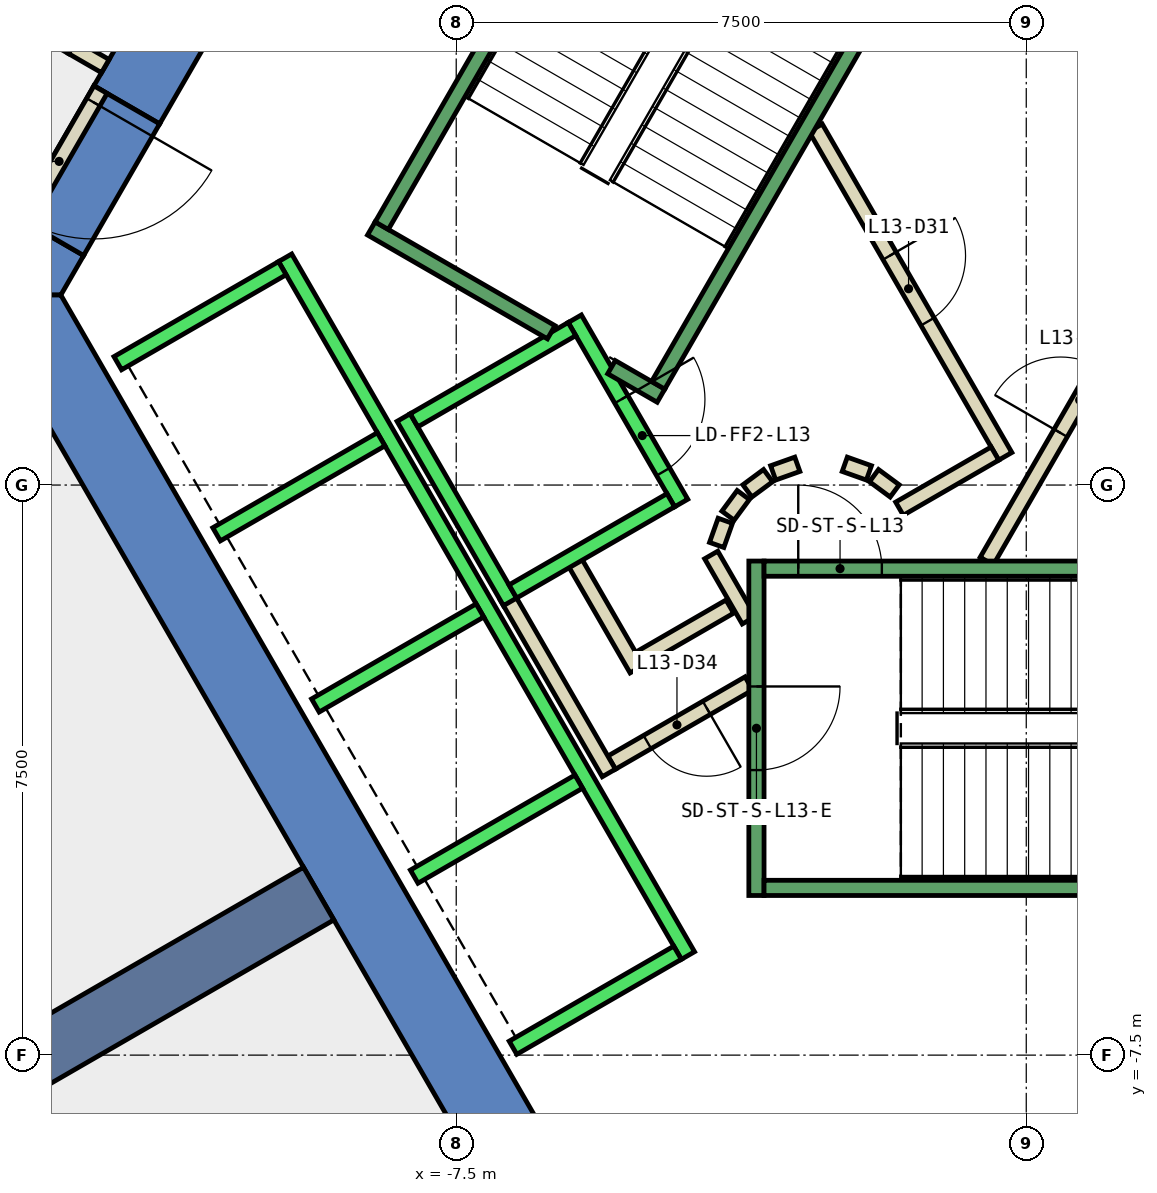
"""IFC4 building model, lengths in metres.
Left out: names, types, materials, properties, quantities, classifications, styles, units other than length and angle.
Written with IfcOpenShell. Run it as: python <this file> out.ifc"""

import sys

from ifc_helpers import new_model, si_unit, direction, frame, frame_2d, origin, place, context, subcontext, project, spatial, polyline, rectangle, outline, extrude, element, fill, save


model = new_model("IFC4")
c1 = context("Model", 3, precision=1e-05, world=origin(), true_north=direction((0.0, 1.0)))
c2 = subcontext(c1, "Body", "Model", "MODEL_VIEW")
j1 = project(units=[si_unit("LENGTHUNIT", "METRE"), si_unit("PLANEANGLEUNIT", "RADIAN")], contexts=[c1])
p1 = place(None, origin())
s1 = spatial("IfcSite", under=j1, at=p1, CompositionType="ELEMENT")
p2 = place(p1, origin())
s2 = spatial("IfcBuilding", under=s1, at=p2, CompositionType="ELEMENT")
p3 = place(p2, frame((0.0, 0.0, 64.4)))
s3 = spatial("IfcBuildingStorey", under=s2, at=p3, CompositionType="ELEMENT", Elevation=64.4)
p4 = place(p3, frame((0.0, 0.0, -0.4)))
e1 = element("IfcWall", 1, at=p4, inside=s3, PredefinedType="SHEAR", context=c2, shape_type="SweptSolid", body=[
    extrude(outline(polyline([(-12.267, 5.252), (-11.402, 4.752), (-6.351, 13.5), (-6.928, 14.5), (-12.267, 5.252)])), origin(), (0.0, 0.0, 1.0), 4.2),
])
p5 = place(p3, frame((0.0, 0.0, -0.4)))
e2 = element("IfcWall", 2, at=p5, inside=s3, PredefinedType="SHEAR", context=c2, shape_type="SweptSolid", body=[
    extrude(outline(polyline([(-12.402, 3.02), (-13.267, 3.52), (-13.856, 2.5), (-12.702, 2.5), (-12.402, 3.02)])), origin(), (0.0, 0.0, 1.0), 4.2),
])
p6 = place(p3, frame((0.0, 0.0, 3.6)))
e3 = element("IfcWall", 3, at=p6, inside=s3, PredefinedType="SHEAR", context=c2, shape_type="SweptSolid", body=[
    extrude(outline(polyline([(-13.267, 3.52), (-12.402, 3.02), (-11.402, 4.752), (-12.267, 5.252), (-13.267, 3.52)])), origin(), (0.0, 0.0, 1.0), 0.2),
])
p7 = place(p3, frame((0.0, 0.0, -0.4)))
e4 = element("IfcWall", 4, at=p7, inside=s3, PredefinedType="SHEAR", context=c2, shape_type="SweptSolid", body=[
    extrude(outline(polyline([(-13.856, 2.5), (-6.928, -9.5), (-6.351, -8.5), (-12.702, 2.5), (-13.856, 2.5)])), origin(), (0.0, 0.0, 1.0), 4.2),
])
p8 = place(p3, frame((-9.31, -5.375, -0.4), z_axis=(0.0, 0.0, 1.0), x_axis=(-0.866017533419, -0.500013631625, 0.0)))
e5 = element("IfcWall", 5, at=p8, inside=s3, PredefinedType="SHEAR", context=c2, shape_type="SweptSolid", body=[
    extrude(rectangle(XDim=9.0, YDim=0.8, at=frame_2d((4.5, 0.0))), origin(), (0.0, 0.0, 1.0), 4.2),
])
p9 = place(p3, frame((-17.783, 8.783, 0.0), z_axis=(0.0, 0.0, 1.0), x_axis=(0.866041598752, -0.499971948444, 0.0)))
e6 = element("IfcWall", 6, at=p9, inside=s3, PredefinedType="PARTITIONING", context=c2, shape_type="SweptSolid", body=[
    extrude(rectangle(XDim=6.042, YDim=0.2, at=frame_2d((3.021, 0.0))), origin(), (0.0, 0.0, 1.0), 3.8),
])
p10 = place(p9, frame((2.771, 0.0, 0.0)))
e7 = element("IfcOpeningElement", 7, at=p10, cuts=e6, PredefinedType="OPENING", context=c2, shape_type="SweptSolid", body=[
    extrude(rectangle(XDim=1.0, YDim=2.1, at=frame_2d((0.5, 1.05))), frame((0.0, 0.11, 0.0), z_axis=(0.0, -1.0, 0.0), x_axis=(1.0, 0.0, 0.0)), (0.0, 0.0, 1.0), 0.22),
])
p11 = place(p3, frame((-3.9, -1.599, 0.0), z_axis=(0.0, 0.0, 1.0), x_axis=(-0.865969445389, -0.500096910261, 0.0)))
e8 = element("IfcWall", 8, at=p11, inside=s3, PredefinedType="PARTITIONING", context=c2, shape_type="SweptSolid", body=[
    extrude(rectangle(XDim=1.373, YDim=0.2, at=frame_2d((0.687, 0.0))), origin(), (0.0, 0.0, 1.0), 3.8),
])
p12 = place(p3, frame((-5.126, -2.422, 0.0), z_axis=(0.0, 0.0, 1.0), x_axis=(-0.500062241894, 0.865989465428, 0.0)))
e9 = element("IfcWall", 9, at=p12, inside=s3, PredefinedType="PARTITIONING", context=c2, shape_type="SweptSolid", body=[
    extrude(rectangle(XDim=1.7, YDim=0.2, at=frame_2d((0.85, 0.0))), origin(), (0.0, 0.0, 1.0), 3.8),
])
p13 = place(p3, frame((-3.65, -2.61, 0.0), z_axis=(0.0, 0.0, 1.0), x_axis=(-0.866072462134, -0.499918483688, 0.0)))
e10 = element("IfcWall", 10, at=p13, inside=s3, PredefinedType="PARTITIONING", context=c2, shape_type="SweptSolid", body=[
    extrude(rectangle(XDim=2.084, YDim=0.2, at=frame_2d((1.042, 0.0))), origin(), (0.0, 0.0, 1.0), 3.8),
])
p14 = place(p13, frame((0.642, 0.0, 0.0)))
e11 = element("IfcOpeningElement", 11, at=p14, cuts=e10, PredefinedType="OPENING", context=c2, shape_type="SweptSolid", body=[
    extrude(rectangle(XDim=0.9, YDim=2.1, at=frame_2d((0.45, 1.05))), frame((0.0, 0.11, 0.0), z_axis=(0.0, -1.0, 0.0), x_axis=(1.0, 0.0, 0.0)), (0.0, 0.0, 1.0), 0.22),
])
p15 = place(p3, frame((-5.492, -3.788, 0.0), z_axis=(0.0, 0.0, 1.0), x_axis=(-0.500008949224, 0.866020236886, 0.0)))
e12 = element("IfcWall", 12, at=p15, inside=s3, PredefinedType="PARTITIONING", context=c2, shape_type="SweptSolid", body=[
    extrude(rectangle(XDim=2.68, YDim=0.2, at=frame_2d((1.34, 0.0))), origin(), (0.0, 0.0, 1.0), 3.8),
])
p16 = place(p3, frame((-4.145, -0.92, 0.0), z_axis=(0.0, 0.0, 1.0), x_axis=(0.499743786207, -0.866173278362, 0.0)))
e13 = element("IfcWall", 13, at=p16, inside=s3, PredefinedType="PARTITIONING", context=c2, shape_type="SweptSolid", body=[
    extrude(rectangle(XDim=0.991, YDim=0.2, at=frame_2d((0.495, 0.0))), origin(), (0.0, 0.0, 1.0), 3.8),
])
p17 = place(p3, frame((-0.52, -1.0, 0.0), z_axis=(0.0, 0.0, 1.0), x_axis=(0.50011622646, 0.865958290007, 0.0)))
e14 = element("IfcWall", 14, at=p17, inside=s3, PredefinedType="PARTITIONING", context=c2, shape_type="SweptSolid", body=[
    extrude(rectangle(XDim=4.991, YDim=0.2, at=frame_2d((2.496, 0.0))), origin(), (0.0, 0.0, 1.0), 3.8),
])
p18 = place(p17, frame((1.945, 0.0, 0.0)))
e15 = element("IfcOpeningElement", 15, at=p18, cuts=e14, PredefinedType="OPENING", context=c2, shape_type="SweptSolid", body=[
    extrude(rectangle(XDim=1.0, YDim=2.1, at=frame_2d((0.5, 1.05))), frame((0.0, 0.11, 0.0), z_axis=(0.0, -1.0, 0.0), x_axis=(1.0, 0.0, 0.0)), (0.0, 0.0, 1.0), 0.22),
])
p19 = place(p3, frame((-2.771, 4.7, 0.0), z_axis=(0.0, 0.0, 1.0), x_axis=(0.499969479948, -0.866043023828, 0.0)))
e16 = element("IfcWall", 16, at=p19, inside=s3, PredefinedType="PARTITIONING", context=c2, shape_type="SweptSolid", body=[
    extrude(rectangle(XDim=4.99, YDim=0.2, at=frame_2d((2.495, 0.0))), origin(), (0.0, 0.0, 1.0), 3.8),
])
p20 = place(p19, frame((1.945, 0.0, 0.0)))
e17 = element("IfcOpeningElement", 17, at=p20, cuts=e16, PredefinedType="OPENING", context=c2, shape_type="SweptSolid", body=[
    extrude(rectangle(XDim=1.0, YDim=2.1, at=frame_2d((0.5, 1.05))), frame((0.0, 0.11, 0.0), z_axis=(0.0, -1.0, 0.0), x_axis=(1.0, 0.0, 0.0)), (0.0, 0.0, 1.0), 0.22),
])
p21 = place(p3, frame((-0.412, 0.414, 0.0), z_axis=(0.0, 0.0, 1.0), x_axis=(-0.866017369001, -0.500013916395, 0.0)))
e18 = element("IfcWall", 18, at=p21, inside=s3, PredefinedType="PARTITIONING", context=c2, shape_type="SweptSolid", body=[
    extrude(rectangle(XDim=1.45, YDim=0.2, at=frame_2d((0.725, 0.0))), origin(), (0.0, 0.0, 1.0), 3.8),
])
p22 = place(p3, frame((-1.731, -0.077, 0.0), z_axis=(0.0, 0.0, 1.0), x_axis=(-0.804311165252, 0.594208338422, 0.0)))
e19 = element("IfcWall", 19, at=p22, inside=s3, PredefinedType="PARTITIONING", context=c2, shape_type="SweptSolid", body=[
    extrude(rectangle(XDim=0.338, YDim=0.2, at=frame_2d((0.169, 0.0))), origin(), (0.0, 0.0, 1.0), 3.8),
])
p23 = place(p3, frame((-2.07, 0.16, 0.0), z_axis=(0.0, 0.0, 1.0), x_axis=(-0.942199461132, 0.335052496547, 0.0)))
e20 = element("IfcWall", 20, at=p23, inside=s3, PredefinedType="PARTITIONING", context=c2, shape_type="SweptSolid", body=[
    extrude(rectangle(XDim=0.337, YDim=0.2, at=frame_2d((0.169, 0.0))), origin(), (0.0, 0.0, 1.0), 3.8),
])
p24 = place(p3, frame((-3.012, 0.273, 0.0), z_axis=(0.0, 0.0, 1.0), x_axis=(-0.942280615813, -0.334824194261, 0.0)))
e21 = element("IfcWall", 21, at=p24, inside=s3, PredefinedType="PARTITIONING", context=c2, shape_type="SweptSolid", body=[
    extrude(rectangle(XDim=0.338, YDim=0.2, at=frame_2d((0.169, 0.0))), origin(), (0.0, 0.0, 1.0), 3.8),
])
p25 = place(p3, frame((-3.397, 0.124, 0.0), z_axis=(0.0, 0.0, 1.0), x_axis=(-0.804311165252, -0.594208338422, 0.0)))
e22 = element("IfcWall", 22, at=p25, inside=s3, PredefinedType="PARTITIONING", context=c2, shape_type="SweptSolid", body=[
    extrude(rectangle(XDim=0.338, YDim=0.2, at=frame_2d((0.169, 0.0))), origin(), (0.0, 0.0, 1.0), 3.8),
])
p26 = place(p3, frame((-3.723, -0.131, 0.0), z_axis=(0.0, 0.0, 1.0), x_axis=(-0.594675113454, -0.803966112121, 0.0)))
e23 = element("IfcWall", 23, at=p26, inside=s3, PredefinedType="PARTITIONING", context=c2, shape_type="SweptSolid", body=[
    extrude(rectangle(XDim=0.338, YDim=0.2, at=frame_2d((0.169, 0.0))), origin(), (0.0, 0.0, 1.0), 3.8),
])
p27 = place(p3, frame((-3.96, -0.47, 0.0), z_axis=(0.0, 0.0, 1.0), x_axis=(-0.334824194261, -0.942280615813, 0.0)))
e24 = element("IfcWall", 24, at=p27, inside=s3, PredefinedType="PARTITIONING", context=c2, shape_type="SweptSolid", body=[
    extrude(rectangle(XDim=0.338, YDim=0.2, at=frame_2d((0.169, 0.0))), origin(), (0.0, 0.0, 1.0), 3.8),
])
p28 = place(p3, frame((-12.18, 5.202, 0.0), z_axis=(0.0, 0.0, 1.0), x_axis=(-0.50002537861, -0.866010750942, 0.0)))
e25 = element("IfcWall", 25, at=p28, inside=s3, PredefinedType="PARTITIONING", context=c2, shape_type="SweptSolid", body=[
    extrude(rectangle(XDim=2.0, YDim=0.2, at=frame_2d((1.0, 0.0))), origin(), (0.0, 0.0, 1.0), 2.4),
])
p29 = place(p28, frame((0.19, 0.0, 0.0)))
e26 = element("IfcOpeningElement", 26, at=p29, cuts=e25, PredefinedType="OPENING", context=c2, shape_type="SweptSolid", body=[
    extrude(rectangle(XDim=1.8, YDim=2.1, at=frame_2d((0.9, 1.05))), frame((0.0, 0.11, 0.0), z_axis=(0.0, -1.0, 0.0), x_axis=(1.0, 0.0, 0.0)), (0.0, 0.0, 1.0), 0.22),
])
p30 = place(p3, frame((-12.55, 5.762, 0.0), z_axis=(0.0, 0.0, 1.0), x_axis=(0.866071776036, -0.499919672301, 0.0)))
e27 = element("IfcWall", 27, at=p30, inside=s3, PredefinedType="PARTITIONING", context=c2, shape_type="SweptSolid", body=[
    extrude(rectangle(XDim=0.5, YDim=0.2, at=frame_2d((0.25, 0.0))), origin(), (0.0, 0.0, 1.0), 2.4),
])
p31 = place(p3, frame((-5.94, 2.188, 0.0), z_axis=(0.0, 0.0, 1.0), x_axis=(0.49994636267, -0.866056369097, 0.0)))
e28 = element("IfcWall", 28, at=p31, inside=s3, PredefinedType="STANDARD", context=c2, shape_type="SweptSolid", body=[
    extrude(rectangle(XDim=2.8, YDim=0.2, at=frame_2d((1.4, 0.0))), origin(), (0.0, 0.0, 1.0), 3.8),
])
p32 = place(p31, frame((1.225, 0.0, 0.0)))
e29 = element("IfcOpeningElement", 29, at=p32, cuts=e28, PredefinedType="OPENING", context=c2, shape_type="SweptSolid", body=[
    extrude(rectangle(XDim=1.1, YDim=2.1, at=frame_2d((0.55, 1.05))), frame((0.0, 0.11, 0.0), z_axis=(0.0, -1.0, 0.0), x_axis=(1.0, 0.0, 0.0)), (0.0, 0.0, 1.0), 0.22),
])
p33 = place(p3, frame((-8.192, 0.888, 0.0), z_axis=(0.0, 0.0, 1.0), x_axis=(0.49994636267, -0.866056369097, 0.0)))
e30 = element("IfcWall", 30, at=p33, inside=s3, PredefinedType="STANDARD", context=c2, shape_type="SweptSolid", body=[
    extrude(rectangle(XDim=2.8, YDim=0.2, at=frame_2d((1.4, 0.0))), origin(), (0.0, 0.0, 1.0), 3.8),
])
for number, where, z_axis, x_axis in (
    (31, (-5.977, 2.052, 0.0), (0.0, 0.0, 1.0), (-0.866, -0.5, 0.0)),
    (32, (-4.677, -0.2, 0.0), (0.0, 0.0, 1.0), (-0.866, -0.5, 0.0)),
):
    element("IfcWall", number, at=place(p3, frame(where, z_axis=z_axis, x_axis=x_axis)), inside=s3, PredefinedType="STANDARD", context=c2, shape_type="SweptSolid", body=[
        extrude(rectangle(XDim=2.399, YDim=0.2, at=frame_2d((1.2, 0.0))), origin(), (0.0, 0.0, 1.0), 3.8),
    ])
p34 = place(p3, frame((-9.751, 2.99, 0.0), z_axis=(0.0, 0.0, 1.0), x_axis=(0.50000090737, -0.866024879913, 0.0)))
e33 = element("IfcWall", 33, at=p34, inside=s3, PredefinedType="STANDARD", context=c2, shape_type="SweptSolid", body=[
    extrude(rectangle(XDim=10.6, YDim=0.2, at=frame_2d((5.3, 0.0))), origin(), (0.0, 0.0, 1.0), 3.8),
])
p35 = place(p3, frame((-9.788, 2.853, 0.0), z_axis=(0.0, 0.0, 1.0), x_axis=(-0.865998541277, -0.500046524342, 0.0)))
e34 = element("IfcWall", 34, at=p35, inside=s3, PredefinedType="STANDARD", context=c2, shape_type="SweptSolid", body=[
    extrude(rectangle(XDim=2.5, YDim=0.2, at=frame_2d((1.25, 0.0))), origin(), (0.0, 0.0, 1.0), 3.8),
])
for number, where, z_axis, x_axis in (
    (35, (-8.488, 0.602, 0.0), (0.0, 0.0, 1.0), (-0.866, -0.5, 0.0)),
    (36, (-7.188, -1.65, 0.0), (0.0, 0.0, 1.0), (-0.866, -0.5, 0.0)),
    (37, (-5.888, -3.902, 0.0), (0.0, 0.0, 1.0), (-0.866, -0.5, 0.0)),
    (38, (-4.588, -6.153, 0.0), (0.0, 0.0, 1.0), (-0.866, -0.5, 0.0)),
):
    element("IfcWall", number, at=place(p3, frame(where, z_axis=z_axis, x_axis=x_axis)), inside=s3, PredefinedType="STANDARD", context=c2, shape_type="SweptSolid", body=[
        extrude(rectangle(XDim=2.5, YDim=0.2, at=frame_2d((1.25, 0.0))), origin(), (0.0, 0.0, 1.0), 3.8),
    ])
p36 = place(p3, frame((-3.55, -1.0, 0.0), z_axis=(0.0, 0.0, 1.0), x_axis=(0.0, -1.0, 0.0)))
e39 = element("IfcWall", 39, at=p36, inside=s3, PredefinedType="STANDARD", context=c2, shape_type="SweptSolid", body=[
    extrude(rectangle(XDim=4.4, YDim=0.2, at=frame_2d((2.2, 0.0))), origin(), (0.0, 0.0, 1.0), 3.8),
])
p37 = place(p36, frame((1.65, 0.0, 0.0)))
e40 = element("IfcOpeningElement", 40, at=p37, cuts=e39, PredefinedType="OPENING", context=c2, shape_type="SweptSolid", body=[
    extrude(rectangle(XDim=1.1, YDim=2.2, at=frame_2d((0.55, 1.1))), frame((0.0, 0.11, 0.0), z_axis=(0.0, -1.0, 0.0), x_axis=(1.0, 0.0, 0.0)), (0.0, 0.0, 1.0), 0.22),
])
p38 = place(p3, frame((-3.45, -1.1, 0.0), z_axis=(0.0, 0.0, 1.0), x_axis=(1.0, 0.0, 0.0)))
e41 = element("IfcWall", 41, at=p38, inside=s3, PredefinedType="STANDARD", context=c2, shape_type="SweptSolid", body=[
    extrude(rectangle(XDim=6.9, YDim=0.2, at=frame_2d((3.45, 0.0))), origin(), (0.0, 0.0, 1.0), 3.8),
])
p39 = place(p38, frame((0.45, 0.0, 0.0)))
e42 = element("IfcOpeningElement", 42, at=p39, cuts=e41, PredefinedType="OPENING", context=c2, shape_type="SweptSolid", body=[
    extrude(rectangle(XDim=1.1, YDim=2.2, at=frame_2d((0.55, 1.1))), frame((0.0, 0.11, 0.0), z_axis=(0.0, -1.0, 0.0), x_axis=(1.0, 0.0, 0.0)), (0.0, 0.0, 1.0), 0.22),
])
p40 = place(p3, frame((-3.45, -5.3, 0.0), z_axis=(0.0, 0.0, 1.0), x_axis=(1.0, 0.0, 0.0)))
e43 = element("IfcWall", 43, at=p40, inside=s3, PredefinedType="STANDARD", context=c2, shape_type="SweptSolid", body=[
    extrude(rectangle(XDim=6.9, YDim=0.2, at=frame_2d((3.45, 0.0))), origin(), (0.0, 0.0, 1.0), 3.8),
])
p41 = place(p3, frame((-6.25, 2.01, 0.0), z_axis=(0.0, 0.0, 1.0), x_axis=(-0.86611865017, 0.499838457731, 0.0)))
e44 = element("IfcWall", 44, at=p41, inside=s3, PredefinedType="STANDARD", context=c2, shape_type="SweptSolid", body=[
    extrude(rectangle(XDim=2.733, YDim=0.2, at=frame_2d((1.366, 0.0))), origin(), (0.0, 0.0, 1.0), 3.8),
])
p42 = place(p3, frame((-4.806, 1.176, 0.0), z_axis=(0.0, 0.0, 1.0), x_axis=(-0.866558586415, 0.499075361355, 0.0)))
e45 = element("IfcWall", 45, at=p42, inside=s3, PredefinedType="STANDARD", context=c2, shape_type="SweptSolid", body=[
    extrude(rectangle(XDim=0.751, YDim=0.2, at=frame_2d((0.376, 0.0))), origin(), (0.0, 0.0, 1.0), 3.8),
])
p43 = place(p3, frame((-1.393, 7.288, 0.0), z_axis=(0.0, 0.0, 1.0), x_axis=(-0.499963383562, -0.866046543262, 0.0)))
e46 = element("IfcWall", 46, at=p43, inside=s3, PredefinedType="STANDARD", context=c2, shape_type="SweptSolid", body=[
    extrude(rectangle(XDim=6.9, YDim=0.2, at=frame_2d((3.45, 0.0))), origin(), (0.0, 0.0, 1.0), 3.8),
])
p44 = place(p43, frame((0.45, 0.0, 0.0)))
e47 = element("IfcOpeningElement", 47, at=p44, cuts=e46, PredefinedType="OPENING", context=c2, shape_type="SweptSolid", body=[
    extrude(rectangle(XDim=1.1, YDim=2.2, at=frame_2d((0.55, 1.1))), frame((0.0, 0.11, 0.0), z_axis=(0.0, -1.0, 0.0), x_axis=(1.0, 0.0, 0.0)), (0.0, 0.0, 1.0), 0.22),
])
p45 = place(p3, frame((-5.03, 9.388, 0.0), z_axis=(0.0, 0.0, 1.0), x_axis=(-0.499978703459, -0.866037698999, 0.0)))
e48 = element("IfcWall", 48, at=p45, inside=s3, PredefinedType="STANDARD", context=c2, shape_type="SweptSolid", body=[
    extrude(rectangle(XDim=6.9, YDim=0.2, at=frame_2d((3.45, 0.0))), origin(), (0.0, 0.0, 1.0), 3.8),
])
p46 = place(p18, origin())
e49 = element("IfcDoor", 49, at=p46, inside=s3, OperationType="SINGLE_SWING_LEFT", PredefinedType="DOOR", context=c2, shape_type="SweptSolid", body=[
    extrude(rectangle(XDim=1.0, YDim=2.1, at=frame_2d((0.5, 1.05))), frame((0.0, 0.025, 0.0), z_axis=(0.0, -1.0, 0.0), x_axis=(1.0, 0.0, 0.0)), (0.0, 0.0, 1.0), 0.05),
])
fill(e15, e49)
p47 = place(p20, origin())
e50 = element("IfcDoor", 50, at=p47, inside=s3, OperationType="SINGLE_SWING_RIGHT", PredefinedType="DOOR", context=c2, shape_type="SweptSolid", body=[
    extrude(rectangle(XDim=1.0, YDim=2.1, at=frame_2d((0.5, 1.05))), frame((0.0, 0.025, 0.0), z_axis=(0.0, -1.0, 0.0), x_axis=(1.0, 0.0, 0.0)), (0.0, 0.0, 1.0), 0.05),
])
fill(e17, e50)
p48 = place(p14, origin())
e51 = element("IfcDoor", 51, at=p48, inside=s3, OperationType="SINGLE_SWING_LEFT", PredefinedType="DOOR", context=c2, shape_type="SweptSolid", body=[
    extrude(rectangle(XDim=0.9, YDim=2.1, at=frame_2d((0.45, 1.05))), frame((0.0, 0.025, 0.0), z_axis=(0.0, -1.0, 0.0), x_axis=(1.0, 0.0, 0.0)), (0.0, 0.0, 1.0), 0.05),
])
fill(e11, e51)
p49 = place(p29, origin())
e52 = element("IfcDoor", 52, at=p49, inside=s3, OperationType="DOUBLE_DOOR_SINGLE_SWING", PredefinedType="DOOR", context=c2, shape_type="SweptSolid", body=[
    extrude(rectangle(XDim=1.8, YDim=2.1, at=frame_2d((0.9, 1.05))), frame((0.0, 0.025, 0.0), z_axis=(0.0, -1.0, 0.0), x_axis=(1.0, 0.0, 0.0)), (0.0, 0.0, 1.0), 0.05),
])
fill(e26, e52)
p50 = place(p32, origin())
e53 = element("IfcDoor", 53, at=p50, inside=s3, OperationType="SLIDING_TO_LEFT", PredefinedType="DOOR", context=c2, shape_type="SweptSolid", body=[
    extrude(rectangle(XDim=1.1, YDim=2.1, at=frame_2d((0.55, 1.05))), frame((0.0, 0.025, 0.0), z_axis=(0.0, -1.0, 0.0), x_axis=(1.0, 0.0, 0.0)), (0.0, 0.0, 1.0), 0.05),
])
fill(e29, e53)
p51 = place(p39, origin())
e54 = element("IfcDoor", 54, at=p51, inside=s3, OperationType="SINGLE_SWING_LEFT", PredefinedType="DOOR", context=c2, shape_type="SweptSolid", body=[
    extrude(rectangle(XDim=1.1, YDim=2.2, at=frame_2d((0.55, 1.1))), frame((0.0, 0.025, 0.0), z_axis=(0.0, -1.0, 0.0), x_axis=(1.0, 0.0, 0.0)), (0.0, 0.0, 1.0), 0.05),
])
fill(e42, e54)
p52 = place(p37, origin())
e55 = element("IfcDoor", 55, at=p52, inside=s3, OperationType="SINGLE_SWING_LEFT", PredefinedType="DOOR", context=c2, shape_type="SweptSolid", body=[
    extrude(rectangle(XDim=1.1, YDim=2.2, at=frame_2d((0.55, 1.1))), frame((0.0, 0.025, 0.0), z_axis=(0.0, -1.0, 0.0), x_axis=(1.0, 0.0, 0.0)), (0.0, 0.0, 1.0), 0.05),
])
fill(e40, e55)
save(model, sys.argv[1])
